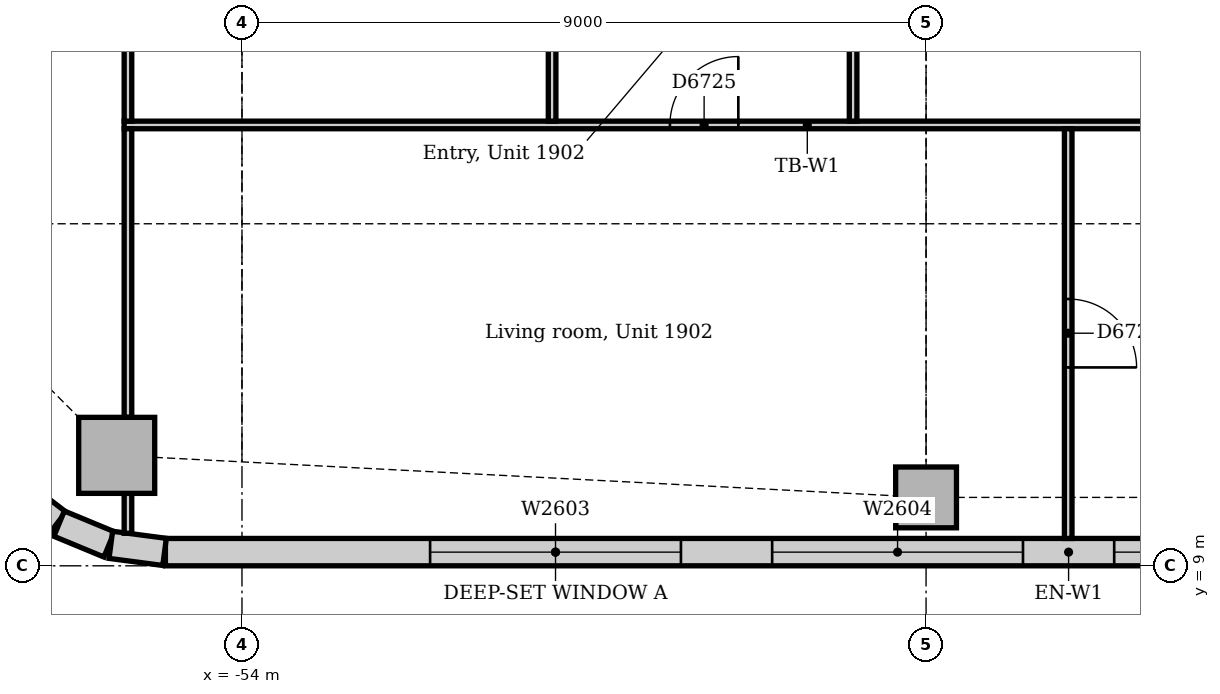
"""IFC4 building model, lengths in metres.
Left out: names, types, materials, properties, quantities, classifications, styles, units other than length and angle.
Written with IfcOpenShell. Run it as: python <this file> out.ifc"""

import sys

from ifc_helpers import new_model, si_unit, direction, frame, frame_2d, origin, origin_2d, place, context, subcontext, project, spatial, rectangle, extrude, element, fill, save


model = new_model("IFC4")
c1 = context("Model", 3, precision=1e-05, world=origin(), true_north=direction((0.0, 1.0)))
c2 = subcontext(c1, "Body", "Model", "MODEL_VIEW")
j1 = project(units=[si_unit("LENGTHUNIT", "METRE"), si_unit("PLANEANGLEUNIT", "RADIAN")], contexts=[c1])
p1 = place(None, origin())
s1 = spatial("IfcSite", under=j1, at=p1, CompositionType="ELEMENT")
p2 = place(p1, origin())
s2 = spatial("IfcBuilding", under=s1, at=p2, CompositionType="ELEMENT")
p3 = place(p2, frame((0.0, 0.0, 83.0)))
s3 = spatial("IfcBuildingStorey", under=s2, at=p3, CompositionType="ELEMENT", Elevation=83.0)
p4 = place(p3, frame((-55.648, 10.453, 0.0), z_axis=(0.0, 0.0, 1.0), x_axis=(1.0, 0.0, 0.0)))
e1 = element("IfcColumn", 1, at=p4, inside=s3, PredefinedType="COLUMN", context=c2, shape_type="SweptSolid", body=[
    extrude(rectangle(XDim=1.0, YDim=1.0, at=origin_2d()), origin(), (0.0, 0.0, 1.0), 3.85),
])
p5 = place(p3, frame((-45.0, 9.9, 0.0), z_axis=(0.0, 0.0, 1.0), x_axis=(1.0, 0.0, 0.0)))
e2 = element("IfcColumn", 2, at=p5, inside=s3, PredefinedType="COLUMN", context=c2, shape_type="SweptSolid", body=[
    extrude(rectangle(XDim=0.8, YDim=0.8, at=origin_2d()), origin(), (0.0, 0.0, 1.0), 3.85),
])
p6 = place(p3, frame((-55.007, 9.18, 0.0), z_axis=(0.0, 0.0, 1.0), x_axis=(1.0, 0.0, 0.0)))
e3 = element("IfcWall", 3, at=p6, inside=s3, PredefinedType="STANDARD", context=c2, shape_type="SweptSolid", body=[
    extrude(rectangle(XDim=23.765, YDim=0.36, at=frame_2d((11.882, 0.0))), origin(), (0.0, 0.0, 1.0), 3.85),
])
p7 = place(p6, frame((3.482, 0.0, 0.9)))
e4 = element("IfcOpeningElement", 4, at=p7, cuts=e3, PredefinedType="OPENING", context=c2, shape_type="SweptSolid", body=[
    extrude(rectangle(XDim=3.3, YDim=1.6, at=frame_2d((1.65, 0.8))), frame((0.0, 0.19, 0.0), z_axis=(0.0, -1.0, 0.0), x_axis=(1.0, 0.0, 0.0)), (0.0, 0.0, 1.0), 0.38),
])
p8 = place(p6, frame((7.982, 0.0, 0.9)))
e5 = element("IfcOpeningElement", 5, at=p8, cuts=e3, PredefinedType="OPENING", context=c2, shape_type="SweptSolid", body=[
    extrude(rectangle(XDim=3.3, YDim=1.6, at=frame_2d((1.65, 0.8))), frame((0.0, 0.19, 0.0), z_axis=(0.0, -1.0, 0.0), x_axis=(1.0, 0.0, 0.0)), (0.0, 0.0, 1.0), 0.38),
])
p9 = place(p6, frame((12.482, 0.0, 0.9)))
e6 = element("IfcOpeningElement", 6, at=p9, cuts=e3, PredefinedType="OPENING", context=c2, shape_type="SweptSolid", body=[
    extrude(rectangle(XDim=3.3, YDim=1.6, at=frame_2d((1.65, 0.8))), frame((0.0, 0.19, 0.0), z_axis=(0.0, -1.0, 0.0), x_axis=(1.0, 0.0, 0.0)), (0.0, 0.0, 1.0), 0.38),
])
p10 = place(p6, frame((17.732, 0.0, 0.9)))
e7 = element("IfcOpeningElement", 7, at=p10, cuts=e3, PredefinedType="OPENING", context=c2, shape_type="SweptSolid", body=[
    extrude(rectangle(XDim=3.3, YDim=1.6, at=frame_2d((1.65, 0.8))), frame((0.0, 0.19, 0.0), z_axis=(0.0, -1.0, 0.0), x_axis=(1.0, 0.0, 0.0)), (0.0, 0.0, 1.0), 0.38),
])
p11 = place(p3, frame((-56.991, 10.0, 0.0), z_axis=(0.0, 0.0, 1.0), x_axis=(0.793321924995, -0.608802368033, 0.0)))
e8 = element("IfcWall", 8, at=p11, inside=s3, PredefinedType="STANDARD", context=c2, shape_type="SweptSolid", body=[
    extrude(rectangle(XDim=0.713, YDim=0.36, at=frame_2d((0.357, 0.0))), origin(), (0.0, 0.0, 1.0), 3.85),
])
for number, where, z_axis, x_axis in (
    (9, (-56.406, 9.555, 0.0), (0.0, 0.0, 1.0), (0.924, -0.383, 0.0)),
    (10, (-55.726, 9.276, 0.0), (0.0, 0.0, 1.0), (0.991, -0.131, 0.0)),
):
    element("IfcWall", number, at=place(p3, frame(where, z_axis=z_axis, x_axis=x_axis)), inside=s3, PredefinedType="STANDARD", context=c2, shape_type="SweptSolid", body=[
        extrude(rectangle(XDim=0.713, YDim=0.36, at=frame_2d((0.356, 0.0))), origin(), (0.0, 0.0, 1.0), 3.85),
    ])
p12 = place(p3, frame((-55.55, 14.8, 0.0), z_axis=(0.0, 0.0, 1.0), x_axis=(1.0, 0.0, 0.0)))
e11 = element("IfcWall", 11, at=p12, inside=s3, PredefinedType="PARTITIONING", context=c2, shape_type="SweptSolid", body=[
    extrude(rectangle(XDim=17.975, YDim=0.1, at=frame_2d((8.988, 0.0))), origin(), (0.0, 0.0, 1.0), 3.85),
])
p13 = place(p12, frame((7.18, 0.0, 0.0)))
e12 = element("IfcOpeningElement", 12, at=p13, cuts=e11, PredefinedType="OPENING", context=c2, shape_type="SweptSolid", body=[
    extrude(rectangle(XDim=0.9, YDim=2.1, at=frame_2d((0.45, 1.05))), frame((0.0, 0.06, 0.0), z_axis=(0.0, -1.0, 0.0), x_axis=(1.0, 0.0, 0.0)), (0.0, 0.0, 1.0), 0.12),
])
p14 = place(p3, frame((-55.5, 14.85, 0.0), z_axis=(0.0, 0.0, 1.0), x_axis=(0.0, 1.0, 0.0)))
e13 = element("IfcWall", 13, at=p14, inside=s3, PredefinedType="PARTITIONING", context=c2, shape_type="SweptSolid", body=[
    extrude(rectangle(XDim=3.075, YDim=0.1, at=frame_2d((1.538, 0.0))), origin(), (0.0, 0.0, 1.0), 3.85),
])
p15 = place(p3, frame((-55.5, 10.953, 0.0), z_axis=(0.0, 0.0, 1.0), x_axis=(0.0, 1.0, 0.0)))
e14 = element("IfcWall", 14, at=p15, inside=s3, PredefinedType="PARTITIONING", context=c2, shape_type="SweptSolid", body=[
    extrude(rectangle(XDim=3.797, YDim=0.1, at=frame_2d((1.898, 0.0))), origin(), (0.0, 0.0, 1.0), 3.85),
])
p16 = place(p3, frame((-55.5, 9.428, 0.0), z_axis=(0.0, 0.0, 1.0), x_axis=(0.0, 1.0, 0.0)))
e15 = element("IfcWall", 15, at=p16, inside=s3, PredefinedType="PARTITIONING", context=c2, shape_type="SweptSolid", body=[
    extrude(rectangle(XDim=0.525, YDim=0.1, at=frame_2d((0.263, 0.0))), origin(), (0.0, 0.0, 1.0), 3.85),
])
p17 = place(p3, frame((-43.13, 9.36, 0.0), z_axis=(0.0, 0.0, 1.0), x_axis=(0.0, 1.0, 0.0)))
e16 = element("IfcWall", 16, at=p17, inside=s3, PredefinedType="PARTITIONING", context=c2, shape_type="SweptSolid", body=[
    extrude(rectangle(XDim=5.39, YDim=0.1, at=frame_2d((2.695, 0.0))), origin(), (0.0, 0.0, 1.0), 3.85),
])
p18 = place(p17, frame((2.25, 0.0, 0.0)))
e17 = element("IfcOpeningElement", 17, at=p18, cuts=e16, PredefinedType="OPENING", context=c2, shape_type="SweptSolid", body=[
    extrude(rectangle(XDim=0.9, YDim=2.1, at=frame_2d((0.45, 1.05))), frame((0.0, 0.06, 0.0), z_axis=(0.0, -1.0, 0.0), x_axis=(1.0, 0.0, 0.0)), (0.0, 0.0, 1.0), 0.12),
])
p19 = place(p3, frame((-49.92, 14.85, 0.0), z_axis=(0.0, 0.0, 1.0), x_axis=(0.0, 1.0, 0.0)))
e18 = element("IfcWall", 18, at=p19, inside=s3, PredefinedType="PARTITIONING", context=c2, shape_type="SweptSolid", body=[
    extrude(rectangle(XDim=3.075, YDim=0.1, at=frame_2d((1.538, 0.0))), origin(), (0.0, 0.0, 1.0), 3.85),
])
p20 = place(p19, frame((1.1, 0.0, 0.0)))
e19 = element("IfcOpeningElement", 19, at=p20, cuts=e18, PredefinedType="OPENING", context=c2, shape_type="SweptSolid", body=[
    extrude(rectangle(XDim=0.9, YDim=2.1, at=frame_2d((0.45, 1.05))), frame((0.0, 0.06, 0.0), z_axis=(0.0, -1.0, 0.0), x_axis=(1.0, 0.0, 0.0)), (0.0, 0.0, 1.0), 0.12),
])
p21 = place(p3, frame((-45.96, 14.85, 0.0), z_axis=(0.0, 0.0, 1.0), x_axis=(0.0, 1.0, 0.0)))
e20 = element("IfcWall", 20, at=p21, inside=s3, PredefinedType="PARTITIONING", context=c2, shape_type="SweptSolid", body=[
    extrude(rectangle(XDim=3.075, YDim=0.1, at=frame_2d((1.538, 0.0))), origin(), (0.0, 0.0, 1.0), 3.85),
])
p22 = place(p21, frame((1.1, 0.0, 0.0)))
e21 = element("IfcOpeningElement", 21, at=p22, cuts=e20, PredefinedType="OPENING", context=c2, shape_type="SweptSolid", body=[
    extrude(rectangle(XDim=0.9, YDim=2.1, at=frame_2d((0.45, 1.05))), frame((0.0, 0.06, 0.0), z_axis=(0.0, -1.0, 0.0), x_axis=(1.0, 0.0, 0.0)), (0.0, 0.0, 1.0), 0.12),
])
p23 = place(p7, origin())
e22 = element("IfcWindow", 22, at=p23, inside=s3, PartitioningType="SINGLE_PANEL", PredefinedType="WINDOW", context=c2, shape_type="SweptSolid", body=[
    extrude(rectangle(XDim=3.3, YDim=1.6, at=frame_2d((1.65, 0.8))), frame((0.0, 0.13, 0.0), z_axis=(0.0, -1.0, 0.0), x_axis=(1.0, 0.0, 0.0)), (0.0, 0.0, 1.0), 0.06),
])
fill(e4, e22)
p24 = place(p8, origin())
e23 = element("IfcWindow", 23, at=p24, inside=s3, PartitioningType="SINGLE_PANEL", PredefinedType="WINDOW", context=c2, shape_type="SweptSolid", body=[
    extrude(rectangle(XDim=3.3, YDim=1.6, at=frame_2d((1.65, 0.8))), frame((0.0, 0.13, 0.0), z_axis=(0.0, -1.0, 0.0), x_axis=(1.0, 0.0, 0.0)), (0.0, 0.0, 1.0), 0.06),
])
fill(e5, e23)
p25 = place(p9, origin())
e24 = element("IfcWindow", 24, at=p25, inside=s3, PartitioningType="SINGLE_PANEL", PredefinedType="WINDOW", context=c2, shape_type="SweptSolid", body=[
    extrude(rectangle(XDim=3.3, YDim=1.6, at=frame_2d((1.65, 0.8))), frame((0.0, 0.13, 0.0), z_axis=(0.0, -1.0, 0.0), x_axis=(1.0, 0.0, 0.0)), (0.0, 0.0, 1.0), 0.06),
])
fill(e6, e24)
p26 = place(p13, origin())
e25 = element("IfcDoor", 25, at=p26, inside=s3, OperationType="SINGLE_SWING_RIGHT", PredefinedType="DOOR", context=c2, shape_type="SweptSolid", body=[
    extrude(rectangle(XDim=0.9, YDim=2.1, at=frame_2d((0.45, 1.05))), frame((0.0, 0.025, 0.0), z_axis=(0.0, -1.0, 0.0), x_axis=(1.0, 0.0, 0.0)), (0.0, 0.0, 1.0), 0.05),
])
fill(e12, e25)
p27 = place(p18, frame((0.9, 0.0, 0.0), z_axis=(0.0, 0.0, 1.0), x_axis=(-1.0, 0.0, 0.0)))
e26 = element("IfcDoor", 26, at=p27, inside=s3, OperationType="SINGLE_SWING_RIGHT", PredefinedType="DOOR", context=c2, shape_type="SweptSolid", body=[
    extrude(rectangle(XDim=0.9, YDim=2.1, at=frame_2d((0.45, 1.05))), frame((0.0, 0.025, 0.0), z_axis=(0.0, -1.0, 0.0), x_axis=(1.0, 0.0, 0.0)), (0.0, 0.0, 1.0), 0.05),
])
fill(e17, e26)
save(model, sys.argv[1])
